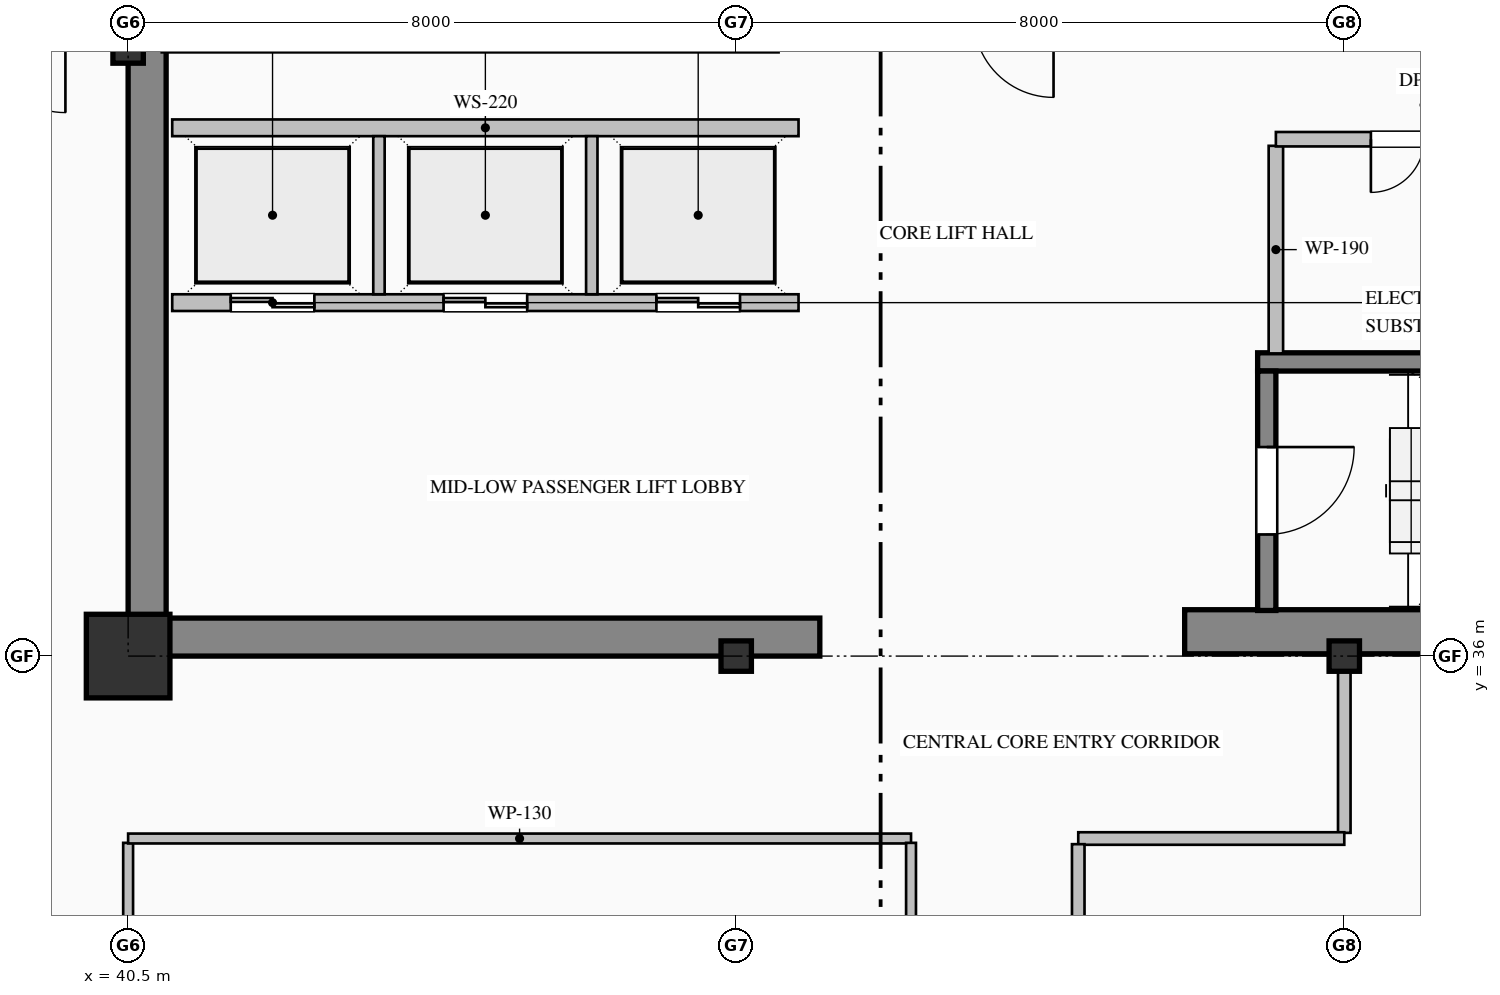
"""IFC4 building model, lengths in metres.
Left out: names, types, materials, properties, quantities, classifications, styles, units other than length and angle.
Written with IfcOpenShell. Run it as: python <this file> out.ifc"""

import sys

from ifc_helpers import new_model, si_unit, direction, frame, frame_2d, origin, origin_2d, place, context, subcontext, project, spatial, rectangle, hollow_rectangle, i_section, extrude, element, fill, save


model = new_model("IFC4")
c1 = context("Model", 3, precision=1e-05, world=origin(), true_north=direction((0.0, 1.0)))
c2 = subcontext(c1, "Body", "Model", "MODEL_VIEW")
j1 = project(units=[si_unit("LENGTHUNIT", "METRE"), si_unit("PLANEANGLEUNIT", "RADIAN")], contexts=[c1])
p1 = place(None, origin())
s1 = spatial("IfcSite", under=j1, at=p1, CompositionType="ELEMENT")
p2 = place(p1, origin())
s2 = spatial("IfcBuilding", under=s1, at=p2, CompositionType="ELEMENT")
p3 = place(p2, frame((0.0, 0.0, 151.0)))
s3 = spatial("IfcBuildingStorey", under=s2, at=p3, CompositionType="ELEMENT", Elevation=151.0)
p4 = place(p3, frame((40.75, 36.5, 0.0), z_axis=(0.0, 0.0, 1.0), x_axis=(0.0, 1.0, 0.0)))
e1 = element("IfcWall", 1, at=p4, inside=s3, PredefinedType="SHEAR", context=c2, shape_type="SweptSolid", body=[
    extrude(rectangle(XDim=7.9, YDim=0.5, at=frame_2d((3.95, 0.0))), origin(), (0.0, 0.0, 1.0), 3.765),
])
p5 = place(p3, frame((40.5, 36.25, 0.0), z_axis=(0.0, 0.0, 1.0), x_axis=(1.0, 0.0, 0.0)))
e2 = element("IfcWall", 2, at=p5, inside=s3, PredefinedType="SHEAR", context=c2, shape_type="SweptSolid", body=[
    extrude(rectangle(XDim=9.1, YDim=0.5, at=frame_2d((4.55, 0.0))), origin(), (0.0, 0.0, 1.0), 3.765),
])
p6 = place(p3, frame((54.4, 36.32, 0.0), z_axis=(0.0, 0.0, 1.0), x_axis=(1.0, 0.0, 0.0)))
e3 = element("IfcWall", 3, at=p6, inside=s3, PredefinedType="SHEAR", context=c2, shape_type="SweptSolid", body=[
    extrude(rectangle(XDim=9.6, YDim=0.58, at=frame_2d((4.8, 0.0))), origin(), (0.0, 0.0, 1.0), 4.0),
])
p7 = place(p3, frame((40.5, 36.0, 0.0), z_axis=(0.0, 0.0, 1.0), x_axis=(1.0, 0.0, 0.0)))
e4 = element("IfcColumn", 4, at=p7, inside=s3, PredefinedType="COLUMN", context=c2, shape_type="SweptSolid", body=[
    extrude(hollow_rectangle(XDim=1.1, YDim=1.1, WallThickness=0.04, at=origin_2d()), origin(), (0.0, 0.0, 1.0), 4.0),
])
for number, where, z_axis, x_axis in (
    (5, (40.5, 44.0, 0.0), (0.0, 0.0, 1.0), (1.0, 0.0, 0.0)),
    (6, (48.5, 36.0, 0.0), (0.0, 0.0, 1.0), (1.0, 0.0, 0.0)),
    (7, (56.5, 36.0, 0.0), (0.0, 0.0, 1.0), (1.0, 0.0, 0.0)),
):
    element("IfcColumn", number, at=place(p3, frame(where, z_axis=z_axis, x_axis=x_axis)), inside=s3, PredefinedType="COLUMN", context=c2, shape_type="SweptSolid", body=[
        extrude(i_section(OverallWidth=0.4, OverallDepth=0.4, WebThickness=0.013, FlangeThickness=0.021, FilletRadius=0.022, at=origin_2d()), origin(), (0.0, 0.0, 1.0), 4.0),
    ])
p8 = place(p3, frame((55.36, 39.87, 0.0), z_axis=(0.0, 0.0, 1.0), x_axis=(1.0, 0.0, 0.0)))
e8 = element("IfcWall", 8, at=p8, inside=s3, PredefinedType="SOLIDWALL", context=c2, shape_type="SweptSolid", body=[
    extrude(rectangle(XDim=8.08, YDim=0.24, at=frame_2d((4.04, 0.0))), origin(), (0.0, 0.0, 1.0), 4.0),
])
p9 = place(p3, frame((55.48, 39.75, 0.0), z_axis=(0.0, 0.0, 1.0), x_axis=(0.0, -1.0, 0.0)))
e9 = element("IfcWall", 9, at=p9, inside=s3, PredefinedType="SOLIDWALL", context=c2, shape_type="SweptSolid", body=[
    extrude(rectangle(XDim=3.15, YDim=0.24, at=frame_2d((1.575, 0.0))), origin(), (0.0, 0.0, 1.0), 4.0),
])
p10 = place(p9, frame((1.0, 0.0, 0.0)))
e10 = element("IfcOpeningElement", 10, at=p10, cuts=e9, PredefinedType="OPENING", context=c2, shape_type="SweptSolid", body=[
    extrude(rectangle(XDim=1.15, YDim=2.2, at=frame_2d((0.575, 1.1))), frame((0.0, 0.13, 0.0), z_axis=(0.0, -1.0, 0.0), x_axis=(1.0, 0.0, 0.0)), (0.0, 0.0, 1.0), 0.26),
])
p11 = place(p3, frame((49.32, 40.65, 0.0), z_axis=(0.0, 0.0, 1.0), x_axis=(-1.0, 0.0, 0.0)))
e11 = element("IfcWall", 11, at=p11, inside=s3, PredefinedType="PARTITIONING", context=c2, shape_type="SweptSolid", body=[
    extrude(rectangle(XDim=8.24, YDim=0.22, at=frame_2d((4.12, 0.0))), origin(), (0.0, 0.0, 1.0), 3.765),
])
p12 = place(p11, frame((6.37, 0.0, 0.0)))
e12 = element("IfcOpeningElement", 12, at=p12, cuts=e11, PredefinedType="OPENING", context=c2, shape_type="SweptSolid", body=[
    extrude(rectangle(XDim=1.1, YDim=2.2, at=frame_2d((0.55, 1.1))), frame((0.0, 0.12, 0.0), z_axis=(0.0, -1.0, 0.0), x_axis=(1.0, 0.0, 0.0)), (0.0, 0.0, 1.0), 0.24),
])
p13 = place(p11, frame((3.57, 0.0, 0.0)))
e13 = element("IfcOpeningElement", 13, at=p13, cuts=e11, PredefinedType="OPENING", context=c2, shape_type="SweptSolid", body=[
    extrude(rectangle(XDim=1.1, YDim=2.2, at=frame_2d((0.55, 1.1))), frame((0.0, 0.12, 0.0), z_axis=(0.0, -1.0, 0.0), x_axis=(1.0, 0.0, 0.0)), (0.0, 0.0, 1.0), 0.24),
])
p14 = place(p11, frame((0.77, 0.0, 0.0)))
e14 = element("IfcOpeningElement", 14, at=p14, cuts=e11, PredefinedType="OPENING", context=c2, shape_type="SweptSolid", body=[
    extrude(rectangle(XDim=1.1, YDim=2.2, at=frame_2d((0.55, 1.1))), frame((0.0, 0.12, 0.0), z_axis=(0.0, -1.0, 0.0), x_axis=(1.0, 0.0, 0.0)), (0.0, 0.0, 1.0), 0.24),
])
p15 = place(p3, frame((41.08, 42.95, 0.0), z_axis=(0.0, 0.0, 1.0), x_axis=(1.0, 0.0, 0.0)))
e15 = element("IfcWall", 15, at=p15, inside=s3, PredefinedType="PARTITIONING", context=c2, shape_type="SweptSolid", body=[
    extrude(rectangle(XDim=8.24, YDim=0.22, at=frame_2d((4.12, 0.0))), origin(), (0.0, 0.0, 1.0), 3.765),
])
for number, where, z_axis, x_axis in (
    (16, (43.8, 40.76, 0.0), (0.0, 0.0, 1.0), (0.0, 1.0, 0.0)),
    (17, (46.6, 40.76, 0.0), (0.0, 0.0, 1.0), (0.0, 1.0, 0.0)),
):
    element("IfcWall", number, at=place(p3, frame(where, z_axis=z_axis, x_axis=x_axis)), inside=s3, PredefinedType="PARTITIONING", context=c2, shape_type="SweptSolid", body=[
        extrude(rectangle(XDim=2.08, YDim=0.15, at=frame_2d((1.04, 0.0))), origin(), (0.0, 0.0, 1.0), 3.765),
    ])
p16 = place(p3, frame((55.6, 42.713, 0.0), z_axis=(0.0, 0.0, 1.0), x_axis=(0.0, -1.0, 0.0)))
e18 = element("IfcWall", 18, at=p16, inside=s3, PredefinedType="PARTITIONING", context=c2, shape_type="SweptSolid", body=[
    extrude(rectangle(XDim=2.731, YDim=0.19, at=frame_2d((1.365, 0.0))), origin(), (0.0, 0.0, 1.0), 3.765),
])
p17 = place(p3, frame((59.5, 42.8, 0.0), z_axis=(0.0, 0.0, 1.0), x_axis=(-1.0, 0.0, 0.0)))
e19 = element("IfcWall", 19, at=p17, inside=s3, PredefinedType="PARTITIONING", context=c2, shape_type="SweptSolid", body=[
    extrude(rectangle(XDim=3.9, YDim=0.19, at=frame_2d((1.95, 0.0))), origin(), (0.0, 0.0, 1.0), 3.765),
])
p18 = place(p17, frame((1.25, 0.0, 0.0)))
e20 = element("IfcOpeningElement", 20, at=p18, cuts=e19, PredefinedType="OPENING", context=c2, shape_type="SweptSolid", body=[
    extrude(rectangle(XDim=1.4, YDim=2.25, at=frame_2d((0.7, 1.125))), frame((0.0, 0.105, 0.0), z_axis=(0.0, -1.0, 0.0), x_axis=(1.0, 0.0, 0.0)), (0.0, 0.0, 1.0), 0.21),
])
p19 = place(p3, frame((40.5, 33.543, 0.0), z_axis=(0.0, 0.0, 1.0), x_axis=(0.0, -1.0, 0.0)))
e21 = element("IfcWall", 21, at=p19, inside=s3, PredefinedType="PARTITIONING", context=c2, shape_type="SweptSolid", body=[
    extrude(rectangle(XDim=2.343, YDim=0.13, at=frame_2d((1.171, 0.0))), origin(), (0.0, 0.0, 1.0), 3.157),
])
p20 = place(p3, frame((56.5, 36.0, 0.0), z_axis=(0.0, 0.0, 1.0), x_axis=(0.0, -1.0, 0.0)))
e22 = element("IfcWall", 22, at=p20, inside=s3, PredefinedType="PARTITIONING", context=c2, shape_type="SweptSolid", body=[
    extrude(rectangle(XDim=2.325, YDim=0.165, at=frame_2d((1.163, 0.0))), origin(), (0.0, 0.0, 1.0), 3.157),
])
p21 = place(p3, frame((56.5, 33.6, 0.0), z_axis=(0.0, 0.0, 1.0), x_axis=(-1.0, 0.0, 0.0)))
e23 = element("IfcWall", 23, at=p21, inside=s3, PredefinedType="PARTITIONING", context=c2, shape_type="SweptSolid", body=[
    extrude(rectangle(XDim=3.5, YDim=0.165, at=frame_2d((1.75, 0.0))), origin(), (0.0, 0.0, 1.0), 3.765),
])
p22 = place(p3, frame((50.8, 33.6, 0.0), z_axis=(0.0, 0.0, 1.0), x_axis=(-1.0, 0.0, 0.0)))
e24 = element("IfcWall", 24, at=p22, inside=s3, PredefinedType="PARTITIONING", context=c2, shape_type="SweptSolid", body=[
    extrude(rectangle(XDim=10.3, YDim=0.13, at=frame_2d((5.15, 0.0))), origin(), (0.0, 0.0, 1.0), 3.765),
])
p23 = place(p3, frame((53.0, 33.525, 0.0), z_axis=(0.0, 0.0, 1.0), x_axis=(0.0, -1.0, 0.0)))
e25 = element("IfcWall", 25, at=p23, inside=s3, PredefinedType="PARTITIONING", context=c2, shape_type="SweptSolid", body=[
    extrude(rectangle(XDim=11.461, YDim=0.165, at=frame_2d((5.73, 0.0))), origin(), (0.0, 0.0, 1.0), 3.765),
])
p24 = place(p23, frame((5.23, 0.0, 0.0)))
e26 = element("IfcOpeningElement", 26, at=p24, cuts=e25, PredefinedType="OPENING", context=c2, shape_type="SweptSolid", body=[
    extrude(rectangle(XDim=1.0, YDim=2.15, at=frame_2d((0.5, 1.075))), frame((0.0, 0.093, 0.0), z_axis=(0.0, -1.0, 0.0), x_axis=(1.0, 0.0, 0.0)), (0.0, 0.0, 1.0), 0.185),
])
p25 = place(p3, frame((50.8, 14.7, 0.0), z_axis=(0.0, 0.0, 1.0), x_axis=(0.0, 1.0, 0.0)))
e27 = element("IfcWall", 27, at=p25, inside=s3, PredefinedType="PARTITIONING", context=c2, shape_type="SweptSolid", body=[
    extrude(rectangle(XDim=18.843, YDim=0.13, at=frame_2d((9.421, 0.0))), origin(), (0.0, 0.0, 1.0), 3.765),
])
p26 = place(p25, frame((8.921, 0.0, 0.0)))
e28 = element("IfcOpeningElement", 28, at=p26, cuts=e27, PredefinedType="OPENING", context=c2, shape_type="SweptSolid", body=[
    extrude(rectangle(XDim=1.0, YDim=2.15, at=frame_2d((0.5, 1.075))), frame((0.0, 0.075, 0.0), z_axis=(0.0, -1.0, 0.0), x_axis=(1.0, 0.0, 0.0)), (0.0, 0.0, 1.0), 0.15),
])
p27 = place(p10, origin())
e29 = element("IfcDoor", 29, at=p27, inside=s3, OperationType="SINGLE_SWING_LEFT", PredefinedType="DOOR", context=c2, shape_type="SweptSolid", body=[
    extrude(rectangle(XDim=1.15, YDim=2.2, at=frame_2d((0.575, 1.1))), frame((0.0, 0.025, 0.0), z_axis=(0.0, -1.0, 0.0), x_axis=(1.0, 0.0, 0.0)), (0.0, 0.0, 1.0), 0.05),
])
fill(e10, e29)
p28 = place(p12, origin())
e30 = element("IfcDoor", 30, at=p28, inside=s3, OperationType="DOUBLE_DOOR_SLIDING", PredefinedType="DOOR", context=c2, shape_type="SweptSolid", body=[
    extrude(rectangle(XDim=1.1, YDim=2.2, at=frame_2d((0.55, 1.1))), frame((0.0, 0.025, 0.0), z_axis=(0.0, -1.0, 0.0), x_axis=(1.0, 0.0, 0.0)), (0.0, 0.0, 1.0), 0.05),
])
fill(e12, e30)
p29 = place(p13, origin())
e31 = element("IfcDoor", 31, at=p29, inside=s3, OperationType="DOUBLE_DOOR_SLIDING", PredefinedType="DOOR", context=c2, shape_type="SweptSolid", body=[
    extrude(rectangle(XDim=1.1, YDim=2.2, at=frame_2d((0.55, 1.1))), frame((0.0, 0.025, 0.0), z_axis=(0.0, -1.0, 0.0), x_axis=(1.0, 0.0, 0.0)), (0.0, 0.0, 1.0), 0.05),
])
fill(e13, e31)
p30 = place(p14, origin())
e32 = element("IfcDoor", 32, at=p30, inside=s3, OperationType="DOUBLE_DOOR_SLIDING", PredefinedType="DOOR", context=c2, shape_type="SweptSolid", body=[
    extrude(rectangle(XDim=1.1, YDim=2.2, at=frame_2d((0.55, 1.1))), frame((0.0, 0.025, 0.0), z_axis=(0.0, -1.0, 0.0), x_axis=(1.0, 0.0, 0.0)), (0.0, 0.0, 1.0), 0.05),
])
fill(e14, e32)
p31 = place(p18, origin())
e33 = element("IfcDoor", 33, at=p31, inside=s3, OperationType="DOUBLE_DOOR_SINGLE_SWING", PredefinedType="DOOR", context=c2, shape_type="SweptSolid", body=[
    extrude(rectangle(XDim=1.4, YDim=2.25, at=frame_2d((0.7, 1.125))), frame((0.0, 0.025, 0.0), z_axis=(0.0, -1.0, 0.0), x_axis=(1.0, 0.0, 0.0)), (0.0, 0.0, 1.0), 0.05),
])
fill(e20, e33)
save(model, sys.argv[1])
